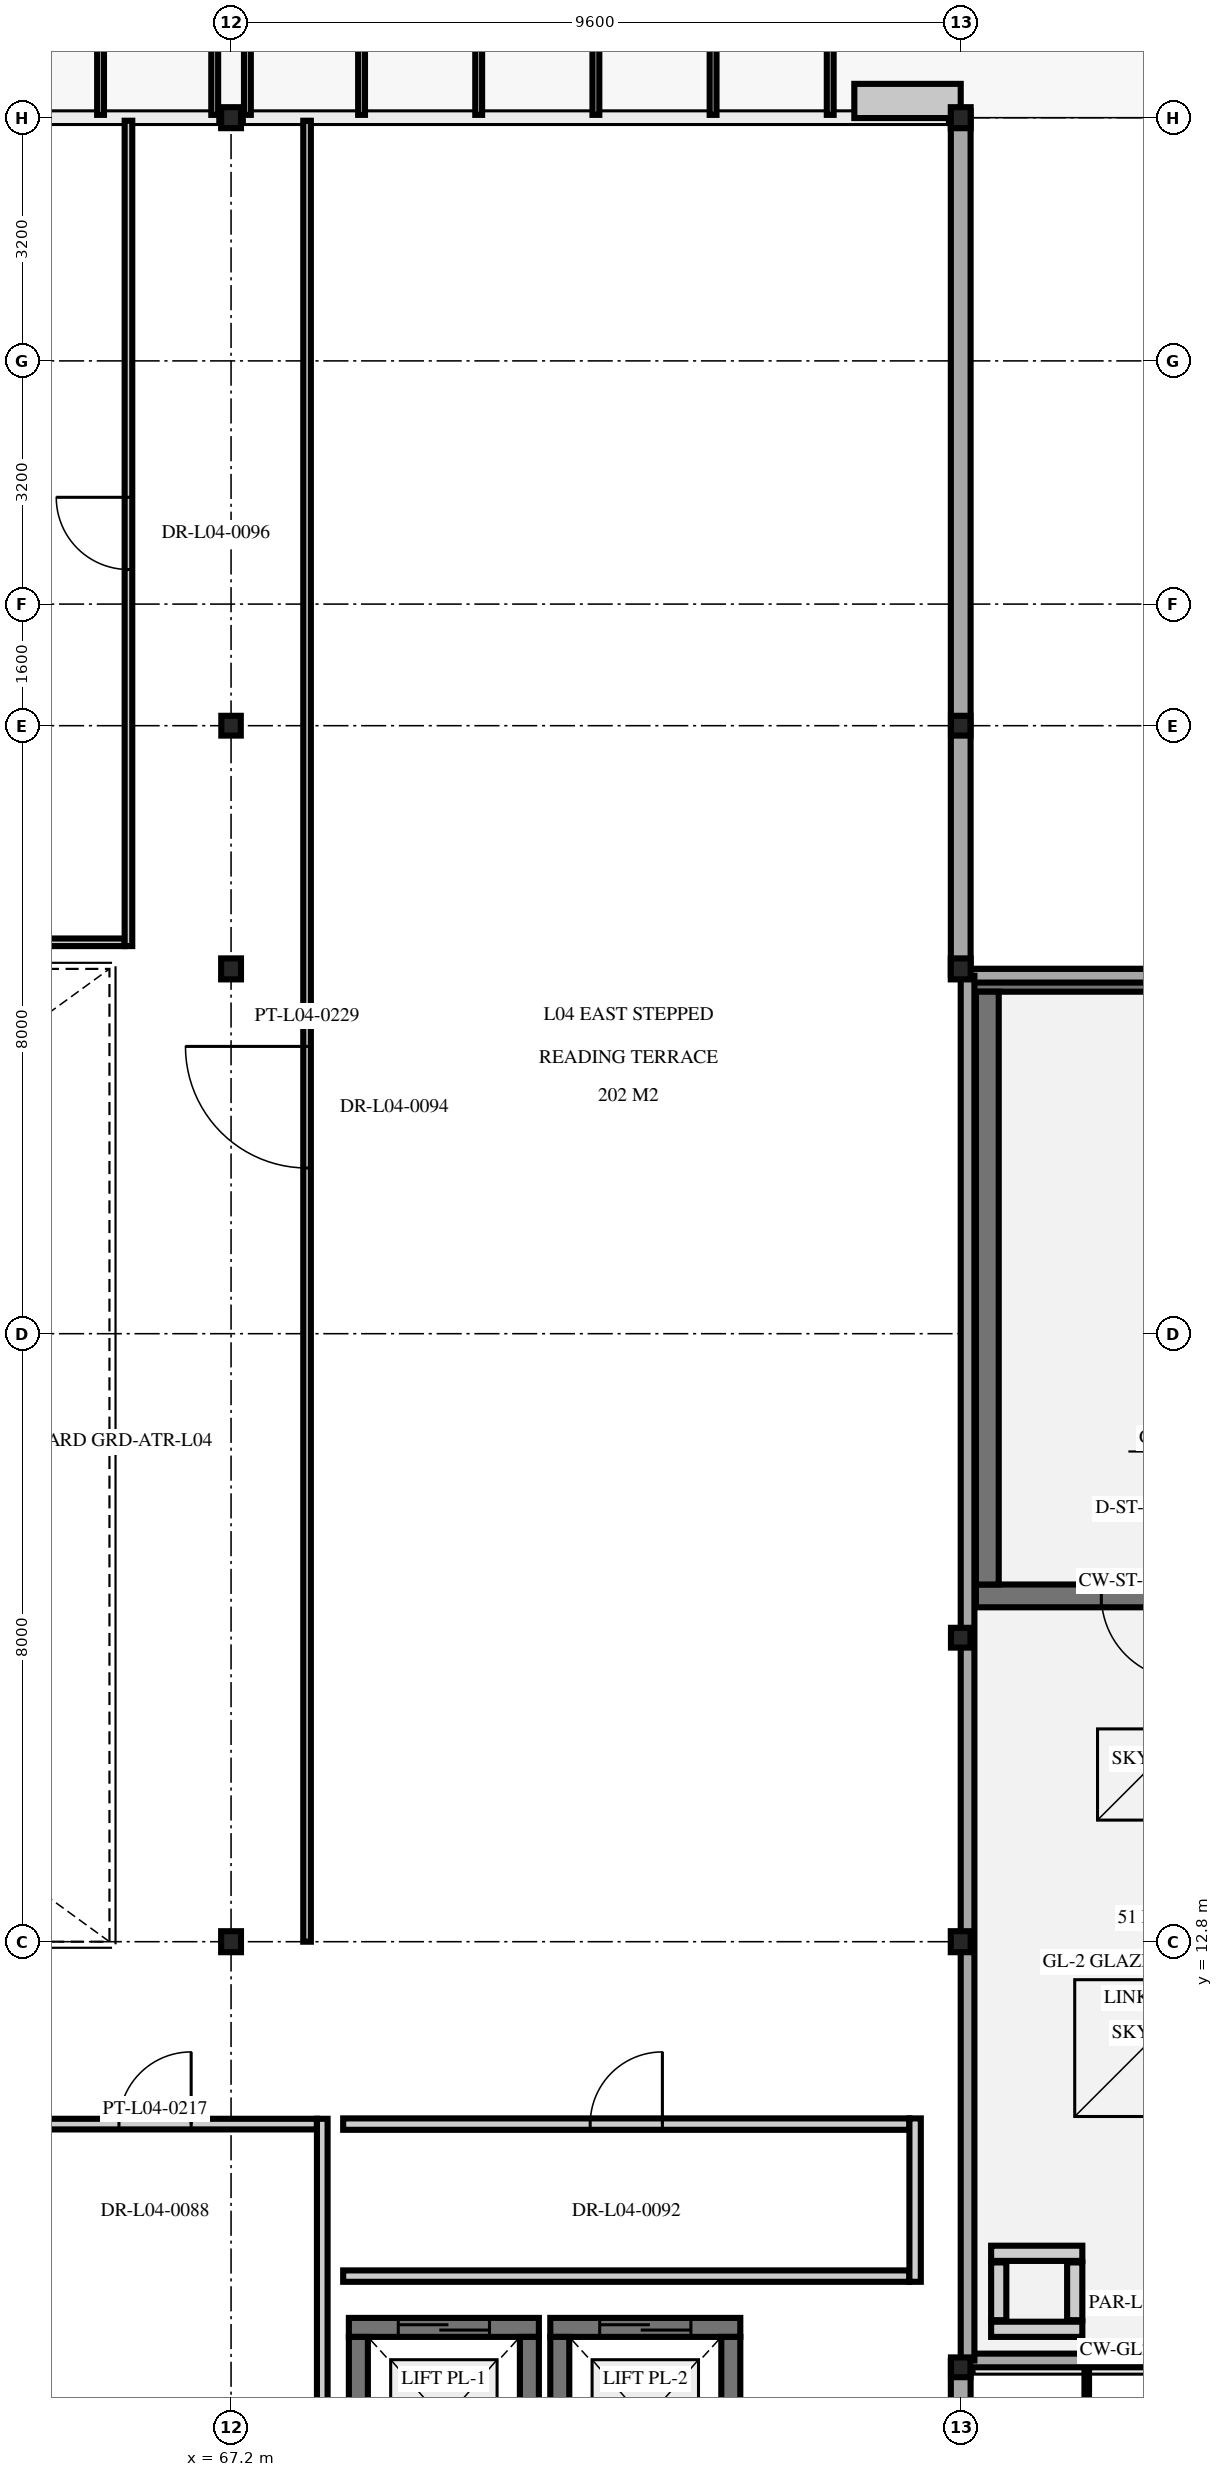
"""IFC4 building model, lengths in metres.
Left out: names, types, materials, properties, quantities, classifications, styles, units other than length and angle.
Written with IfcOpenShell. Run it as: python <this file> out.ifc"""

import sys

from ifc_helpers import new_model, si_unit, direction, frame, frame_2d, origin, origin_2d, place, context, subcontext, project, spatial, rectangle, i_section, extrude, element, fill, save


model = new_model("IFC4")
c1 = context("Model", 3, precision=1e-05, world=origin(), true_north=direction((0.0, 1.0)))
c2 = subcontext(c1, "Body", "Model", "MODEL_VIEW")
j1 = project(units=[si_unit("LENGTHUNIT", "METRE"), si_unit("PLANEANGLEUNIT", "RADIAN")], contexts=[c1])
p1 = place(None, origin())
s1 = spatial("IfcSite", under=j1, at=p1, CompositionType="ELEMENT")
p2 = place(p1, origin())
s2 = spatial("IfcBuilding", under=s1, at=p2, CompositionType="ELEMENT")
p3 = place(p2, frame((0.0, 0.0, 18.6)))
s3 = spatial("IfcBuildingStorey", under=s2, at=p3, CompositionType="ELEMENT", Elevation=18.6)
for number, where, z_axis, x_axis in (
    (1, (67.2, 12.8, 0.0), (0.0, 0.0, 1.0), (1.0, 0.0, 0.0)),
    (2, (67.2, 25.6, 0.0), (0.0, 0.0, 1.0), (1.0, 0.0, 0.0)),
):
    element("IfcColumn", number, at=place(p3, frame(where, z_axis=z_axis, x_axis=x_axis)), inside=s3, PredefinedType="COLUMN", context=c2, shape_type="SweptSolid", body=[
        extrude(i_section(OverallWidth=0.261, OverallDepth=0.276, WebThickness=0.015, FlangeThickness=0.025, at=origin_2d()), origin(), (0.0, 0.0, 1.0), 4.5),
    ])
p4 = place(p3, frame((67.2, 36.8, 0.0), z_axis=(0.0, 0.0, 1.0), x_axis=(1.0, 0.0, 0.0)))
e3 = element("IfcColumn", 3, at=p4, inside=s3, PredefinedType="COLUMN", context=c2, shape_type="SweptSolid", body=[
    extrude(i_section(OverallWidth=0.261, OverallDepth=0.276, WebThickness=0.015, FlangeThickness=0.025, at=origin_2d()), origin(), (0.0, 0.0, 1.0), 4.31),
])
for number, where, z_axis, x_axis in (
    (4, (76.8, 12.8, 0.0), (0.0, 0.0, 1.0), (1.0, 0.0, 0.0)),
    (5, (76.8, 25.6, 0.0), (0.0, 0.0, 1.0), (1.0, 0.0, 0.0)),
):
    element("IfcColumn", number, at=place(p3, frame(where, z_axis=z_axis, x_axis=x_axis)), inside=s3, PredefinedType="COLUMN", context=c2, shape_type="SweptSolid", body=[
        extrude(i_section(OverallWidth=0.261, OverallDepth=0.276, WebThickness=0.015, FlangeThickness=0.025, at=origin_2d()), origin(), (0.0, 0.0, 1.0), 4.5),
    ])
p5 = place(p3, frame((76.8, 36.8, 0.0), z_axis=(0.0, 0.0, 1.0), x_axis=(1.0, 0.0, 0.0)))
e6 = element("IfcColumn", 6, at=p5, inside=s3, PredefinedType="COLUMN", context=c2, shape_type="SweptSolid", body=[
    extrude(i_section(OverallWidth=0.261, OverallDepth=0.276, WebThickness=0.015, FlangeThickness=0.025, at=origin_2d()), origin(), (0.0, 0.0, 1.0), 4.31),
])
for number, where, z_axis, x_axis in (
    (7, (67.2, 28.8, 0.0), (0.0, 0.0, 1.0), (1.0, 0.0, 0.0)),
    (8, (76.8, 28.8, 0.0), (0.0, 0.0, 1.0), (1.0, 0.0, 0.0)),
    (9, (76.8, 7.2, 0.0), (0.0, 0.0, 1.0), (1.0, 0.0, 0.0)),
    (10, (76.8, 16.8, 0.0), (0.0, 0.0, 1.0), (1.0, 0.0, 0.0)),
):
    element("IfcColumn", number, at=place(p3, frame(where, z_axis=z_axis, x_axis=x_axis)), inside=s3, PredefinedType="COLUMN", context=c2, shape_type="SweptSolid", body=[
        extrude(i_section(OverallWidth=0.256, OverallDepth=0.26, WebThickness=0.01, FlangeThickness=0.017, at=origin_2d()), origin(), (0.0, 0.0, 1.0), 4.5),
    ])
p6 = place(p3, frame((81.4, 17.35, 0.0), z_axis=(0.0, 0.0, 1.0), x_axis=(-1.0, 0.0, 0.0)))
e11 = element("IfcWall", 11, at=p6, inside=s3, PredefinedType="SHEAR", context=c2, shape_type="SweptSolid", body=[
    extrude(rectangle(XDim=4.4, YDim=0.3, at=frame_2d((2.2, 0.0))), origin(), (0.0, 0.0, 1.0), 2.605),
])
p7 = place(p6, frame((1.65, 0.0, 0.0)))
e12 = element("IfcOpeningElement", 12, at=p7, cuts=e11, PredefinedType="OPENING", context=c2, shape_type="SweptSolid", body=[
    extrude(rectangle(XDim=1.1, YDim=2.2, at=frame_2d((0.55, 1.1))), frame((0.0, 0.16, 0.0), z_axis=(0.0, -1.0, 0.0), x_axis=(1.0, 0.0, 0.0)), (0.0, 0.0, 1.0), 0.32),
])
p8 = place(p3, frame((76.82, 25.45, 0.0), z_axis=(0.0, 0.0, 1.0), x_axis=(1.0, 0.0, 0.0)))
e13 = element("IfcWall", 13, at=p8, inside=s3, PredefinedType="SHEAR", context=c2, shape_type="SweptSolid", body=[
    extrude(rectangle(XDim=4.76, YDim=0.3, at=frame_2d((2.38, 0.0))), origin(), (0.0, 0.0, 1.0), 2.605),
])
p9 = place(p3, frame((77.15, 17.5, 0.0), z_axis=(0.0, 0.0, 1.0), x_axis=(0.0, 1.0, 0.0)))
e14 = element("IfcWall", 14, at=p9, inside=s3, PredefinedType="SHEAR", context=c2, shape_type="SweptSolid", body=[
    extrude(rectangle(XDim=7.8, YDim=0.3, at=frame_2d((3.9, 0.0))), origin(), (0.0, 0.0, 1.0), 2.605),
])
p10 = place(p3, frame((68.75, 7.725, 0.0), z_axis=(0.0, 0.0, 1.0), x_axis=(1.0, 0.0, 0.0)))
e15 = element("IfcWall", 15, at=p10, inside=s3, PredefinedType="SHEAR", context=c2, shape_type="SweptSolid", body=[
    extrude(rectangle(XDim=2.5, YDim=0.25, at=frame_2d((1.25, 0.0))), origin(), (0.0, 0.0, 1.0), 4.28),
])
p11 = place(p10, frame((0.65, 0.0, 0.0)))
e16 = element("IfcOpeningElement", 16, at=p11, cuts=e15, PredefinedType="OPENING", context=c2, shape_type="SweptSolid", body=[
    extrude(rectangle(XDim=1.2, YDim=2.2, at=frame_2d((0.6, 1.1))), frame((0.0, 0.135, 0.0), z_axis=(0.0, -1.0, 0.0), x_axis=(1.0, 0.0, 0.0)), (0.0, 0.0, 1.0), 0.27),
])
for number, where, z_axis, x_axis in (
    (17, (68.875, 5.4, 0.0), (0.0, 0.0, 1.0), (0.0, 1.0, 0.0)),
    (18, (71.125, 7.6, 0.0), (0.0, 0.0, 1.0), (0.0, -1.0, 0.0)),
):
    element("IfcWall", number, at=place(p3, frame(where, z_axis=z_axis, x_axis=x_axis)), inside=s3, PredefinedType="SHEAR", context=c2, shape_type="SweptSolid", body=[
        extrude(rectangle(XDim=2.2, YDim=0.25, at=frame_2d((1.1, 0.0))), origin(), (0.0, 0.0, 1.0), 4.28),
    ])
p12 = place(p3, frame((71.4, 7.725, 0.0), z_axis=(0.0, 0.0, 1.0), x_axis=(1.0, 0.0, 0.0)))
e19 = element("IfcWall", 19, at=p12, inside=s3, PredefinedType="SHEAR", context=c2, shape_type="SweptSolid", body=[
    extrude(rectangle(XDim=2.5, YDim=0.25, at=frame_2d((1.25, 0.0))), origin(), (0.0, 0.0, 1.0), 4.28),
])
p13 = place(p12, frame((0.65, 0.0, 0.0)))
e20 = element("IfcOpeningElement", 20, at=p13, cuts=e19, PredefinedType="OPENING", context=c2, shape_type="SweptSolid", body=[
    extrude(rectangle(XDim=1.2, YDim=2.2, at=frame_2d((0.6, 1.1))), frame((0.0, 0.135, 0.0), z_axis=(0.0, -1.0, 0.0), x_axis=(1.0, 0.0, 0.0)), (0.0, 0.0, 1.0), 0.27),
])
for number, where, z_axis, x_axis in (
    (21, (71.525, 5.4, 0.0), (0.0, 0.0, 1.0), (0.0, 1.0, 0.0)),
    (22, (73.775, 7.6, 0.0), (0.0, 0.0, 1.0), (0.0, -1.0, 0.0)),
):
    element("IfcWall", number, at=place(p3, frame(where, z_axis=z_axis, x_axis=x_axis)), inside=s3, PredefinedType="SHEAR", context=c2, shape_type="SweptSolid", body=[
        extrude(rectangle(XDim=2.2, YDim=0.25, at=frame_2d((1.1, 0.0))), origin(), (0.0, 0.0, 1.0), 4.28),
    ])
for number, where, z_axis, x_axis in (
    (23, (78.4, 7.7, 0.0), (0.0, 0.0, 1.0), (-1.0, 0.0, 0.0)),
    (24, (77.2, 8.7, 0.0), (0.0, 0.0, 1.0), (1.0, 0.0, 0.0)),
):
    element("IfcWall", number, at=place(p3, frame(where, z_axis=z_axis, x_axis=x_axis)), inside=s3, PredefinedType="PARTITIONING", context=c2, shape_type="SweptSolid", body=[
        extrude(rectangle(XDim=1.2, YDim=0.2, at=frame_2d((0.6, 0.0))), origin(), (0.0, 0.0, 1.0), 2.105),
    ])
for number, where, z_axis, x_axis in (
    (25, (77.3, 7.82, 0.0), (0.0, 0.0, 1.0), (0.0, 1.0, 0.0)),
    (26, (78.3, 8.58, 0.0), (0.0, 0.0, 1.0), (0.0, -1.0, 0.0)),
):
    element("IfcWall", number, at=place(p3, frame(where, z_axis=z_axis, x_axis=x_axis)), inside=s3, PredefinedType="PARTITIONING", context=c2, shape_type="SweptSolid", body=[
        extrude(rectangle(XDim=0.76, YDim=0.2, at=frame_2d((0.38, 0.0))), origin(), (0.0, 0.0, 1.0), 2.105),
    ])
p14 = place(p3, frame((76.8, 7.285, 0.0), z_axis=(0.0, 0.0, 1.0), x_axis=(0.0, -1.0, 0.0)))
e27 = element("IfcWall", 27, at=p14, inside=s3, PredefinedType="SOLIDWALL", context=c2, shape_type="SweptSolid", body=[
    extrude(rectangle(XDim=2.57, YDim=0.26, at=frame_2d((1.285, 0.0))), origin(), (0.0, 0.0, 1.0), 3.855),
])
p15 = place(p3, frame((76.8, 36.885, 0.0), z_axis=(0.0, 0.0, 1.0), x_axis=(0.0, -1.0, 0.0)))
e28 = element("IfcWall", 28, at=p15, inside=s3, PredefinedType="SOLIDWALL", context=c2, shape_type="SweptSolid", body=[
    extrude(rectangle(XDim=11.37, YDim=0.26, at=frame_2d((5.685, 0.0))), origin(), (0.0, 0.0, 1.0), 3.855),
])
for number, where, z_axis, x_axis in (
    (29, (81.51, 7.29, 2.85), (0.0, 0.0, 1.0), (-1.0, 0.0, 0.0)),
    (30, (76.89, 25.51, 2.85), (0.0, 0.0, 1.0), (1.0, 0.0, 0.0)),
):
    element("IfcWall", number, at=place(p3, frame(where, z_axis=z_axis, x_axis=x_axis)), inside=s3, PredefinedType="PARAPET", context=c2, shape_type="SweptSolid", body=[
        extrude(rectangle(XDim=4.62, YDim=0.18, at=frame_2d((2.31, 0.0))), origin(), (0.0, 0.0, 1.0), 0.45),
    ])
p16 = place(p3, frame((76.89, 7.29, 2.85), z_axis=(0.0, 0.0, 1.0), x_axis=(0.0, 1.0, 0.0)))
e31 = element("IfcWall", 31, at=p16, inside=s3, PredefinedType="PARAPET", context=c2, shape_type="SweptSolid", body=[
    extrude(rectangle(XDim=18.22, YDim=0.18, at=frame_2d((9.11, 0.0))), origin(), (0.0, 0.0, 1.0), 0.45),
])
p17 = place(p3, frame((64.07, 10.4, 0.0), z_axis=(0.0, 0.0, 1.0), x_axis=(1.0, 0.0, 0.0)))
e32 = element("IfcWall", 32, at=p17, inside=s3, PredefinedType="PARTITIONING", context=c2, shape_type="SweptSolid", body=[
    extrude(rectangle(XDim=4.26, YDim=0.14, at=frame_2d((2.13, 0.0))), origin(), (0.0, 0.0, 1.0), 3.925),
])
p18 = place(p17, frame((1.655, 0.0, 0.0)))
e33 = element("IfcOpeningElement", 33, at=p18, cuts=e32, PredefinedType="OPENING", context=c2, shape_type="SweptSolid", body=[
    extrude(rectangle(XDim=0.95, YDim=2.1, at=frame_2d((0.475, 1.05))), frame((0.0, 0.08, 0.0), z_axis=(0.0, -1.0, 0.0), x_axis=(1.0, 0.0, 0.0)), (0.0, 0.0, 1.0), 0.16),
])
p19 = place(p3, frame((68.4, 4.84, 0.0), z_axis=(0.0, 0.0, 1.0), x_axis=(0.0, 1.0, 0.0)))
e34 = element("IfcWall", 34, at=p19, inside=s3, PredefinedType="PARTITIONING", context=c2, shape_type="SweptSolid", body=[
    extrude(rectangle(XDim=5.63, YDim=0.14, at=frame_2d((2.815, 0.0))), origin(), (0.0, 0.0, 1.0), 3.855),
])
p20 = place(p3, frame((68.675, 8.4, 0.0), z_axis=(0.0, 0.0, 1.0), x_axis=(1.0, 0.0, 0.0)))
e35 = element("IfcWall", 35, at=p20, inside=s3, PredefinedType="PARTITIONING", context=c2, shape_type="SweptSolid", body=[
    extrude(rectangle(XDim=7.45, YDim=0.15, at=frame_2d((3.725, 0.0))), origin(), (0.0, 0.0, 1.0), 4.025),
])
p21 = place(p3, frame((68.675, 10.4, 0.0), z_axis=(0.0, 0.0, 1.0), x_axis=(1.0, 0.0, 0.0)))
e36 = element("IfcWall", 36, at=p21, inside=s3, PredefinedType="PARTITIONING", context=c2, shape_type="SweptSolid", body=[
    extrude(rectangle(XDim=7.45, YDim=0.15, at=frame_2d((3.725, 0.0))), origin(), (0.0, 0.0, 1.0), 4.025),
])
p22 = place(p21, frame((3.25, 0.0, 0.0)))
e37 = element("IfcOpeningElement", 37, at=p22, cuts=e36, PredefinedType="OPENING", context=c2, shape_type="SweptSolid", body=[
    extrude(rectangle(XDim=0.95, YDim=2.15, at=frame_2d((0.475, 1.075))), frame((0.0, 0.085, 0.0), z_axis=(0.0, -1.0, 0.0), x_axis=(1.0, 0.0, 0.0)), (0.0, 0.0, 1.0), 0.17),
])
p23 = place(p3, frame((76.2, 8.325, 0.0), z_axis=(0.0, 0.0, 1.0), x_axis=(0.0, 1.0, 0.0)))
e38 = element("IfcWall", 38, at=p23, inside=s3, PredefinedType="PARTITIONING", context=c2, shape_type="SweptSolid", body=[
    extrude(rectangle(XDim=2.15, YDim=0.15, at=frame_2d((1.075, 0.0))), origin(), (0.0, 0.0, 1.0), 4.28),
])
p24 = place(p3, frame((68.2, 12.8, 0.0), z_axis=(0.0, 0.0, 1.0), x_axis=(0.0, 1.0, 0.0)))
e39 = element("IfcWall", 39, at=p24, inside=s3, PredefinedType="MOVABLE", context=c2, shape_type="SweptSolid", body=[
    extrude(rectangle(XDim=23.96, YDim=0.1, at=frame_2d((11.98, 0.0))), origin(), (0.0, 0.0, 1.0), 3.855),
])
p25 = place(p24, frame((10.18, 0.0, 0.0)))
e40 = element("IfcOpeningElement", 40, at=p25, cuts=e39, PredefinedType="OPENING", context=c2, shape_type="SweptSolid", body=[
    extrude(rectangle(XDim=1.6, YDim=2.25, at=frame_2d((0.8, 1.125))), frame((0.0, 0.06, 0.0), z_axis=(0.0, -1.0, 0.0), x_axis=(1.0, 0.0, 0.0)), (0.0, 0.0, 1.0), 0.12),
])
p26 = place(p3, frame((57.6, 25.95, 0.0), z_axis=(0.0, 0.0, 1.0), x_axis=(1.0, 0.0, 0.0)))
e41 = element("IfcWall", 41, at=p26, inside=s3, PredefinedType="MOVABLE", context=c2, shape_type="SweptSolid", body=[
    extrude(rectangle(XDim=8.2, YDim=0.1, at=frame_2d((4.1, 0.0))), origin(), (0.0, 0.0, 1.0), 3.925),
])
p27 = place(p3, frame((65.85, 25.9, 0.0), z_axis=(0.0, 0.0, 1.0), x_axis=(0.0, 1.0, 0.0)))
e42 = element("IfcWall", 42, at=p27, inside=s3, PredefinedType="MOVABLE", context=c2, shape_type="SweptSolid", body=[
    extrude(rectangle(XDim=10.86, YDim=0.1, at=frame_2d((5.43, 0.0))), origin(), (0.0, 0.0, 1.0), 3.855),
])
p28 = place(p27, frame((4.955, 0.0, 0.0)))
e43 = element("IfcOpeningElement", 43, at=p28, cuts=e42, PredefinedType="OPENING", context=c2, shape_type="SweptSolid", body=[
    extrude(rectangle(XDim=0.95, YDim=2.15, at=frame_2d((0.475, 1.075))), frame((0.0, 0.06, 0.0), z_axis=(0.0, -1.0, 0.0), x_axis=(1.0, 0.0, 0.0)), (0.0, 0.0, 1.0), 0.12),
])
p29 = place(p7, origin())
e44 = element("IfcDoor", 44, at=p29, inside=s3, OperationType="SINGLE_SWING_LEFT", PredefinedType="DOOR", context=c2, shape_type="SweptSolid", body=[
    extrude(rectangle(XDim=1.1, YDim=2.2, at=frame_2d((0.55, 1.1))), frame((0.0, 0.025, 0.0), z_axis=(0.0, -1.0, 0.0), x_axis=(1.0, 0.0, 0.0)), (0.0, 0.0, 1.0), 0.05),
])
fill(e12, e44)
p30 = place(p11, origin())
e45 = element("IfcDoor", 45, at=p30, inside=s3, OperationType="DOUBLE_DOOR_SLIDING", PredefinedType="DOOR", context=c2, shape_type="SweptSolid", body=[
    extrude(rectangle(XDim=1.2, YDim=2.2, at=frame_2d((0.6, 1.1))), frame((0.0, 0.025, 0.0), z_axis=(0.0, -1.0, 0.0), x_axis=(1.0, 0.0, 0.0)), (0.0, 0.0, 1.0), 0.05),
])
fill(e16, e45)
p31 = place(p13, origin())
e46 = element("IfcDoor", 46, at=p31, inside=s3, OperationType="DOUBLE_DOOR_SLIDING", PredefinedType="DOOR", context=c2, shape_type="SweptSolid", body=[
    extrude(rectangle(XDim=1.2, YDim=2.2, at=frame_2d((0.6, 1.1))), frame((0.0, 0.025, 0.0), z_axis=(0.0, -1.0, 0.0), x_axis=(1.0, 0.0, 0.0)), (0.0, 0.0, 1.0), 0.05),
])
fill(e20, e46)
p32 = place(p3, frame((0.0, 0.0, 2.6)))
p33 = place(p32, frame((79.2, 11.4, 0.2)))
e47 = element("IfcWindow", 47, at=p33, inside=s3, PartitioningType="SINGLE_PANEL", PredefinedType="SKYLIGHT", context=c2, shape_type="SweptSolid", body=[
    extrude(rectangle(XDim=1.8, YDim=1.8, at=origin_2d()), origin(), (0.0, 0.0, 1.0), 0.05),
])
p34 = place(p32, frame((79.2, 15.0, 0.2)))
e48 = element("IfcWindow", 48, at=p34, inside=s3, PartitioningType="SINGLE_PANEL", PredefinedType="SKYLIGHT", context=c2, shape_type="SweptSolid", body=[
    extrude(rectangle(XDim=1.2, YDim=1.2, at=origin_2d()), origin(), (0.0, 0.0, 1.0), 0.05),
])
p35 = place(p18, origin())
e49 = element("IfcDoor", 49, at=p35, inside=s3, OperationType="SINGLE_SWING_RIGHT", PredefinedType="DOOR", context=c2, shape_type="SweptSolid", body=[
    extrude(rectangle(XDim=0.95, YDim=2.1, at=frame_2d((0.475, 1.05))), frame((0.0, 0.025, 0.0), z_axis=(0.0, -1.0, 0.0), x_axis=(1.0, 0.0, 0.0)), (0.0, 0.0, 1.0), 0.05),
])
fill(e33, e49)
p36 = place(p22, origin())
e50 = element("IfcDoor", 50, at=p36, inside=s3, OperationType="SINGLE_SWING_RIGHT", PredefinedType="DOOR", context=c2, shape_type="SweptSolid", body=[
    extrude(rectangle(XDim=0.95, YDim=2.15, at=frame_2d((0.475, 1.075))), frame((0.0, 0.025, 0.0), z_axis=(0.0, -1.0, 0.0), x_axis=(1.0, 0.0, 0.0)), (0.0, 0.0, 1.0), 0.05),
])
fill(e37, e50)
p37 = place(p25, origin())
e51 = element("IfcDoor", 51, at=p37, inside=s3, OperationType="DOUBLE_DOOR_SINGLE_SWING", PredefinedType="DOOR", context=c2, shape_type="SweptSolid", body=[
    extrude(rectangle(XDim=1.6, YDim=2.25, at=frame_2d((0.8, 1.125))), frame((0.0, 0.025, 0.0), z_axis=(0.0, -1.0, 0.0), x_axis=(1.0, 0.0, 0.0)), (0.0, 0.0, 1.0), 0.05),
])
fill(e40, e51)
p38 = place(p28, origin())
e52 = element("IfcDoor", 52, at=p38, inside=s3, OperationType="SINGLE_SWING_RIGHT", PredefinedType="DOOR", context=c2, shape_type="SweptSolid", body=[
    extrude(rectangle(XDim=0.95, YDim=2.15, at=frame_2d((0.475, 1.075))), frame((0.0, 0.025, 0.0), z_axis=(0.0, -1.0, 0.0), x_axis=(1.0, 0.0, 0.0)), (0.0, 0.0, 1.0), 0.05),
])
fill(e43, e52)
save(model, sys.argv[1])
